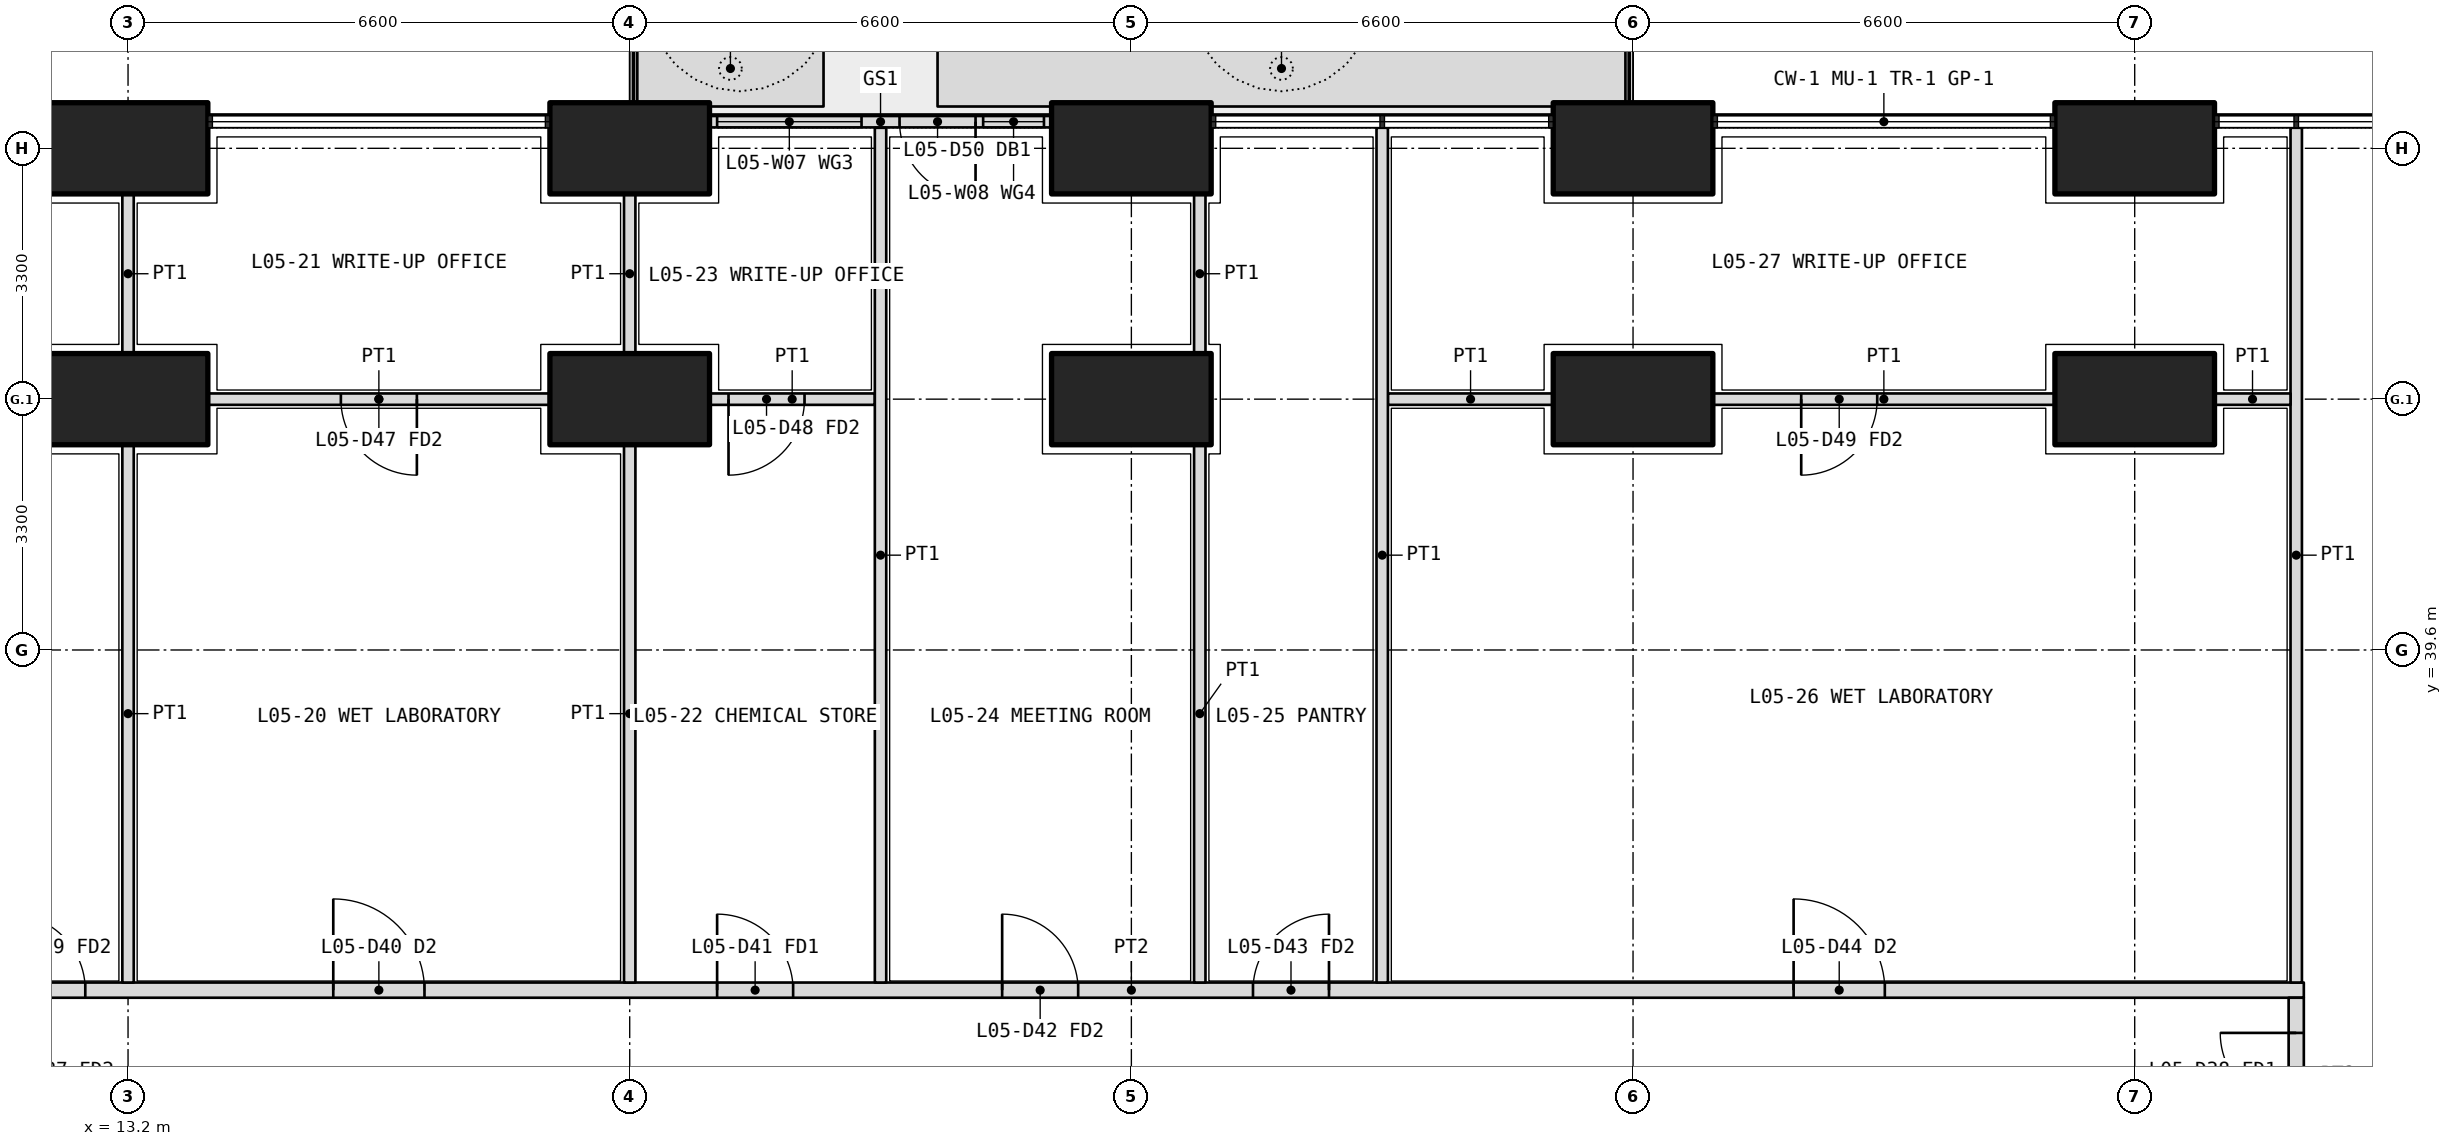
"""IFC4 building model, lengths in metres.
Left out: names, types, materials, properties, quantities, classifications, styles, units other than length and angle.
Written with IfcOpenShell. Run it as: python <this file> out.ifc"""

import sys

from ifc_helpers import new_model, si_unit, direction, frame, frame_2d, origin, origin_2d, place, context, subcontext, project, spatial, polyline, rectangle, outline, extrude, element, fill, save


model = new_model("IFC4")
c1 = context("Model", 3, precision=1e-05, world=origin(), true_north=direction((0.0, 1.0)))
c2 = subcontext(c1, "Body", "Model", "MODEL_VIEW")
j1 = project(units=[si_unit("LENGTHUNIT", "METRE"), si_unit("PLANEANGLEUNIT", "RADIAN")], contexts=[c1])
p1 = place(None, origin())
s1 = spatial("IfcSite", under=j1, at=p1, CompositionType="ELEMENT")
p2 = place(p1, origin())
s2 = spatial("IfcBuilding", under=s1, at=p2, CompositionType="ELEMENT")
p3 = place(p2, frame((0.0, 0.0, 25.5)))
s3 = spatial("IfcBuildingStorey", under=s2, at=p3, CompositionType="ELEMENT", Elevation=25.5)
for number, where, z_axis, x_axis in (
    (1, (13.2, 46.2, 0.0), (0.0, 0.0, 1.0), (1.0, 0.0, 0.0)),
    (2, (19.8, 46.2, 0.0), (0.0, 0.0, 1.0), (1.0, 0.0, 0.0)),
    (3, (26.4, 46.2, 0.0), (0.0, 0.0, 1.0), (1.0, 0.0, 0.0)),
    (4, (33.0, 46.2, 0.0), (0.0, 0.0, 1.0), (1.0, 0.0, 0.0)),
    (5, (39.6, 46.2, 0.0), (0.0, 0.0, 1.0), (1.0, 0.0, 0.0)),
    (6, (13.2, 42.9, 0.0), (0.0, 0.0, 1.0), (1.0, 0.0, 0.0)),
    (7, (19.8, 42.9, 0.0), (0.0, 0.0, 1.0), (1.0, 0.0, 0.0)),
    (8, (26.4, 42.9, 0.0), (0.0, 0.0, 1.0), (1.0, 0.0, 0.0)),
    (9, (33.0, 42.9, 0.0), (0.0, 0.0, 1.0), (1.0, 0.0, 0.0)),
    (10, (39.6, 42.9, 0.0), (0.0, 0.0, 1.0), (1.0, 0.0, 0.0)),
):
    element("IfcColumn", number, at=place(p3, frame(where, z_axis=z_axis, x_axis=x_axis)), inside=s3, PredefinedType="COLUMN", context=c2, shape_type="SweptSolid", body=[
        extrude(rectangle(XDim=2.1, YDim=1.2, at=origin_2d()), origin(), (0.0, 0.0, 1.0), 4.2),
    ])
p4 = place(p3, origin())
e11 = element("IfcWall", 11, at=p4, inside=s3, PredefinedType="USERDEFINED", context=c2, shape_type="SweptSolid", body=[
    extrude(outline(polyline([(19.9, 46.75), (22.35, 46.75), (22.35, 47.75), (19.9, 47.75), (19.9, 46.75)]), holes=[polyline([(20.05, 46.9), (22.2, 46.9), (22.2, 47.6), (20.05, 47.6), (20.05, 46.9)])]), origin(), (0.0, 0.0, 1.0), 1.05),
])
p5 = place(p3, origin())
e12 = element("IfcWall", 12, at=p5, inside=s3, PredefinedType="USERDEFINED", context=c2, shape_type="SweptSolid", body=[
    extrude(outline(polyline([(23.85, 46.75), (32.9, 46.75), (32.9, 47.75), (23.85, 47.75), (23.85, 46.75)]), holes=[polyline([(24.0, 46.9), (32.75, 46.9), (32.75, 47.6), (24.0, 47.6), (24.0, 46.9)])]), origin(), (0.0, 0.0, 1.0), 1.05),
])
p6 = place(p3, frame((25.35, 46.55, 0.0), z_axis=(0.0, 0.0, 1.0), x_axis=(-1.0, 0.0, 0.0)))
e13 = element("IfcWall", 13, at=p6, inside=s3, PredefinedType="SOLIDWALL", context=c2, shape_type="SweptSolid", body=[
    extrude(rectangle(XDim=4.5, YDim=0.15, at=frame_2d((2.25, 0.0))), origin(), (0.0, 0.0, 1.0), 2.7),
])
p7 = place(p6, frame((1.0, 0.0, 0.0)))
e14 = element("IfcOpeningElement", 14, at=p7, cuts=e13, PredefinedType="OPENING", context=c2, shape_type="SweptSolid", body=[
    extrude(rectangle(XDim=1.0, YDim=2.4, at=frame_2d((0.5, 1.2))), frame((0.0, 0.085, 0.0), z_axis=(0.0, -1.0, 0.0), x_axis=(1.0, 0.0, 0.0)), (0.0, 0.0, 1.0), 0.17),
])
p8 = place(p6, frame((0.1, 0.0, 0.1)))
e15 = element("IfcOpeningElement", 15, at=p8, cuts=e13, PredefinedType="OPENING", context=c2, shape_type="SweptSolid", body=[
    extrude(rectangle(XDim=0.8, YDim=2.3, at=frame_2d((0.4, 1.15))), frame((0.0, 0.085, 0.0), z_axis=(0.0, -1.0, 0.0), x_axis=(1.0, 0.0, 0.0)), (0.0, 0.0, 1.0), 0.17),
])
p9 = place(p6, frame((2.5, 0.0, 0.1)))
e16 = element("IfcOpeningElement", 16, at=p9, cuts=e13, PredefinedType="OPENING", context=c2, shape_type="SweptSolid", body=[
    extrude(rectangle(XDim=1.9, YDim=2.3, at=frame_2d((0.95, 1.15))), frame((0.0, 0.085, 0.0), z_axis=(0.0, -1.0, 0.0), x_axis=(1.0, 0.0, 0.0)), (0.0, 0.0, 1.0), 0.17),
])
p10 = place(p3, frame((10.975, 35.125, 0.0), z_axis=(0.0, 0.0, 1.0), x_axis=(1.0, 0.0, 0.0)))
e17 = element("IfcWall", 17, at=p10, inside=s3, PredefinedType="PARTITIONING", context=c2, shape_type="SweptSolid", body=[
    extrude(rectangle(XDim=30.85, YDim=0.2, at=frame_2d((15.425, 0.0))), origin(), (0.0, 0.0, 1.0), 2.85),
])
p11 = place(p10, frame((0.663, 0.0, 0.0)))
e18 = element("IfcOpeningElement", 18, at=p11, cuts=e17, PredefinedType="OPENING", context=c2, shape_type="SweptSolid", body=[
    extrude(rectangle(XDim=1.0, YDim=2.1, at=frame_2d((0.5, 1.05))), frame((0.0, 0.11, 0.0), z_axis=(0.0, -1.0, 0.0), x_axis=(1.0, 0.0, 0.0)), (0.0, 0.0, 1.0), 0.22),
])
p12 = place(p10, frame((4.925, 0.0, 0.0)))
e19 = element("IfcOpeningElement", 19, at=p12, cuts=e17, PredefinedType="OPENING", context=c2, shape_type="SweptSolid", body=[
    extrude(rectangle(XDim=1.2, YDim=2.1, at=frame_2d((0.6, 1.05))), frame((0.0, 0.11, 0.0), z_axis=(0.0, -1.0, 0.0), x_axis=(1.0, 0.0, 0.0)), (0.0, 0.0, 1.0), 0.22),
])
p13 = place(p10, frame((9.975, 0.0, 0.0)))
e20 = element("IfcOpeningElement", 20, at=p13, cuts=e17, PredefinedType="OPENING", context=c2, shape_type="SweptSolid", body=[
    extrude(rectangle(XDim=1.0, YDim=2.1, at=frame_2d((0.5, 1.05))), frame((0.0, 0.11, 0.0), z_axis=(0.0, -1.0, 0.0), x_axis=(1.0, 0.0, 0.0)), (0.0, 0.0, 1.0), 0.22),
])
p14 = place(p10, frame((13.725, 0.0, 0.0)))
e21 = element("IfcOpeningElement", 21, at=p14, cuts=e17, PredefinedType="OPENING", context=c2, shape_type="SweptSolid", body=[
    extrude(rectangle(XDim=1.0, YDim=2.1, at=frame_2d((0.5, 1.05))), frame((0.0, 0.11, 0.0), z_axis=(0.0, -1.0, 0.0), x_axis=(1.0, 0.0, 0.0)), (0.0, 0.0, 1.0), 0.22),
])
p15 = place(p10, frame((17.025, 0.0, 0.0)))
e22 = element("IfcOpeningElement", 22, at=p15, cuts=e17, PredefinedType="OPENING", context=c2, shape_type="SweptSolid", body=[
    extrude(rectangle(XDim=1.0, YDim=2.1, at=frame_2d((0.5, 1.05))), frame((0.0, 0.11, 0.0), z_axis=(0.0, -1.0, 0.0), x_axis=(1.0, 0.0, 0.0)), (0.0, 0.0, 1.0), 0.22),
])
p16 = place(p10, frame((24.137, 0.0, 0.0)))
e23 = element("IfcOpeningElement", 23, at=p16, cuts=e17, PredefinedType="OPENING", context=c2, shape_type="SweptSolid", body=[
    extrude(rectangle(XDim=1.2, YDim=2.1, at=frame_2d((0.6, 1.05))), frame((0.0, 0.11, 0.0), z_axis=(0.0, -1.0, 0.0), x_axis=(1.0, 0.0, 0.0)), (0.0, 0.0, 1.0), 0.22),
])
p17 = place(p3, frame((41.725, 33.0, 0.0), z_axis=(0.0, 0.0, 1.0), x_axis=(0.0, 1.0, 0.0)))
e24 = element("IfcWall", 24, at=p17, inside=s3, PredefinedType="PARTITIONING", context=c2, shape_type="SweptSolid", body=[
    extrude(rectangle(XDim=2.025, YDim=0.2, at=frame_2d((1.012, 0.0))), origin(), (0.0, 0.0, 1.0), 2.85),
])
p18 = place(p17, frame((0.562, 0.0, 0.0)))
e25 = element("IfcOpeningElement", 25, at=p18, cuts=e24, PredefinedType="OPENING", context=c2, shape_type="SweptSolid", body=[
    extrude(rectangle(XDim=1.0, YDim=2.1, at=frame_2d((0.5, 1.05))), frame((0.0, 0.11, 0.0), z_axis=(0.0, -1.0, 0.0), x_axis=(1.0, 0.0, 0.0)), (0.0, 0.0, 1.0), 0.22),
])
p19 = place(p3, frame((41.725, 46.47, 0.0), z_axis=(0.0, 0.0, 1.0), x_axis=(0.0, -1.0, 0.0)))
e26 = element("IfcWall", 26, at=p19, inside=s3, PredefinedType="PARTITIONING", context=c2, shape_type="SweptSolid", body=[
    extrude(rectangle(XDim=11.245, YDim=0.15, at=frame_2d((5.623, 0.0))), origin(), (0.0, 0.0, 1.0), 2.7),
])
p20 = place(p3, frame((41.65, 42.9, 0.0), z_axis=(0.0, 0.0, 1.0), x_axis=(-1.0, 0.0, 0.0)))
e27 = element("IfcWall", 27, at=p20, inside=s3, PredefinedType="PARTITIONING", context=c2, shape_type="SweptSolid", body=[
    extrude(rectangle(XDim=1.0, YDim=0.15, at=frame_2d((0.5, 0.0))), origin(), (0.0, 0.0, 1.0), 3.9),
])
p21 = place(p3, frame((38.55, 42.9, 0.0), z_axis=(0.0, 0.0, 1.0), x_axis=(-1.0, 0.0, 0.0)))
e28 = element("IfcWall", 28, at=p21, inside=s3, PredefinedType="PARTITIONING", context=c2, shape_type="SweptSolid", body=[
    extrude(rectangle(XDim=4.5, YDim=0.15, at=frame_2d((2.25, 0.0))), origin(), (0.0, 0.0, 1.0), 3.9),
])
p22 = place(p21, frame((2.337, 0.0, 0.0)))
e29 = element("IfcOpeningElement", 29, at=p22, cuts=e28, PredefinedType="OPENING", context=c2, shape_type="SweptSolid", body=[
    extrude(rectangle(XDim=1.0, YDim=2.1, at=frame_2d((0.5, 1.05))), frame((0.0, 0.085, 0.0), z_axis=(0.0, -1.0, 0.0), x_axis=(1.0, 0.0, 0.0)), (0.0, 0.0, 1.0), 0.17),
])
p23 = place(p3, frame((31.95, 42.9, 0.0), z_axis=(0.0, 0.0, 1.0), x_axis=(-1.0, 0.0, 0.0)))
e30 = element("IfcWall", 30, at=p23, inside=s3, PredefinedType="PARTITIONING", context=c2, shape_type="SweptSolid", body=[
    extrude(rectangle(XDim=2.175, YDim=0.15, at=frame_2d((1.087, 0.0))), origin(), (0.0, 0.0, 1.0), 3.9),
])
p24 = place(p3, frame((23.025, 42.9, 0.0), z_axis=(0.0, 0.0, 1.0), x_axis=(-1.0, 0.0, 0.0)))
e31 = element("IfcWall", 31, at=p24, inside=s3, PredefinedType="PARTITIONING", context=c2, shape_type="SweptSolid", body=[
    extrude(rectangle(XDim=2.175, YDim=0.15, at=frame_2d((1.087, 0.0))), origin(), (0.0, 0.0, 1.0), 3.9),
])
p25 = place(p24, frame((0.925, 0.0, 0.0)))
e32 = element("IfcOpeningElement", 32, at=p25, cuts=e31, PredefinedType="OPENING", context=c2, shape_type="SweptSolid", body=[
    extrude(rectangle(XDim=1.0, YDim=2.1, at=frame_2d((0.5, 1.05))), frame((0.0, 0.085, 0.0), z_axis=(0.0, -1.0, 0.0), x_axis=(1.0, 0.0, 0.0)), (0.0, 0.0, 1.0), 0.17),
])
p26 = place(p3, frame((18.75, 42.9, 0.0), z_axis=(0.0, 0.0, 1.0), x_axis=(-1.0, 0.0, 0.0)))
e33 = element("IfcWall", 33, at=p26, inside=s3, PredefinedType="PARTITIONING", context=c2, shape_type="SweptSolid", body=[
    extrude(rectangle(XDim=4.5, YDim=0.15, at=frame_2d((2.25, 0.0))), origin(), (0.0, 0.0, 1.0), 3.9),
])
p27 = place(p26, frame((1.75, 0.0, 0.0)))
e34 = element("IfcOpeningElement", 34, at=p27, cuts=e33, PredefinedType="OPENING", context=c2, shape_type="SweptSolid", body=[
    extrude(rectangle(XDim=1.0, YDim=2.1, at=frame_2d((0.5, 1.05))), frame((0.0, 0.085, 0.0), z_axis=(0.0, -1.0, 0.0), x_axis=(1.0, 0.0, 0.0)), (0.0, 0.0, 1.0), 0.17),
])
p28 = place(p3, frame((27.3, 45.6, 0.0), z_axis=(0.0, 0.0, 1.0), x_axis=(0.0, -1.0, 0.0)))
e35 = element("IfcWall", 35, at=p28, inside=s3, PredefinedType="PARTITIONING", context=c2, shape_type="SweptSolid", body=[
    extrude(rectangle(XDim=2.1, YDim=0.15, at=frame_2d((1.05, 0.0))), origin(), (0.0, 0.0, 1.0), 3.9),
])
p29 = place(p3, frame((27.3, 42.3, 0.0), z_axis=(0.0, 0.0, 1.0), x_axis=(0.0, -1.0, 0.0)))
e36 = element("IfcWall", 36, at=p29, inside=s3, PredefinedType="PARTITIONING", context=c2, shape_type="SweptSolid", body=[
    extrude(rectangle(XDim=7.075, YDim=0.15, at=frame_2d((3.538, 0.0))), origin(), (0.0, 0.0, 1.0), 3.9),
])
p30 = place(p3, frame((13.2, 45.6, 0.0), z_axis=(0.0, 0.0, 1.0), x_axis=(0.0, -1.0, 0.0)))
e37 = element("IfcWall", 37, at=p30, inside=s3, PredefinedType="PARTITIONING", context=c2, shape_type="SweptSolid", body=[
    extrude(rectangle(XDim=2.1, YDim=0.15, at=frame_2d((1.05, 0.0))), origin(), (0.0, 0.0, 1.0), 2.85),
])
p31 = place(p3, frame((13.2, 42.3, 0.0), z_axis=(0.0, 0.0, 1.0), x_axis=(0.0, -1.0, 0.0)))
e38 = element("IfcWall", 38, at=p31, inside=s3, PredefinedType="PARTITIONING", context=c2, shape_type="SweptSolid", body=[
    extrude(rectangle(XDim=7.075, YDim=0.15, at=frame_2d((3.538, 0.0))), origin(), (0.0, 0.0, 1.0), 2.85),
])
p32 = place(p3, frame((19.8, 45.6, 0.0), z_axis=(0.0, 0.0, 1.0), x_axis=(0.0, -1.0, 0.0)))
e39 = element("IfcWall", 39, at=p32, inside=s3, PredefinedType="PARTITIONING", context=c2, shape_type="SweptSolid", body=[
    extrude(rectangle(XDim=2.1, YDim=0.15, at=frame_2d((1.05, 0.0))), origin(), (0.0, 0.0, 1.0), 2.85),
])
p33 = place(p3, frame((19.8, 42.3, 0.0), z_axis=(0.0, 0.0, 1.0), x_axis=(0.0, -1.0, 0.0)))
e40 = element("IfcWall", 40, at=p33, inside=s3, PredefinedType="PARTITIONING", context=c2, shape_type="SweptSolid", body=[
    extrude(rectangle(XDim=7.075, YDim=0.15, at=frame_2d((3.538, 0.0))), origin(), (0.0, 0.0, 1.0), 2.85),
])
for number, where, z_axis, x_axis in (
    (41, (23.1, 46.47, 0.0), (0.0, 0.0, 1.0), (0.0, -1.0, 0.0)),
    (42, (29.7, 46.47, 0.0), (0.0, 0.0, 1.0), (0.0, -1.0, 0.0)),
):
    element("IfcWall", number, at=place(p3, frame(where, z_axis=z_axis, x_axis=x_axis)), inside=s3, PredefinedType="PARTITIONING", context=c2, shape_type="SweptSolid", body=[
        extrude(rectangle(XDim=11.245, YDim=0.15, at=frame_2d((5.623, 0.0))), origin(), (0.0, 0.0, 1.0), 2.7),
    ])
p34 = place(p7, origin())
e43 = element("IfcDoor", 43, at=p34, inside=s3, OperationType="SINGLE_SWING_LEFT", PredefinedType="DOOR", context=c2, shape_type="SweptSolid", body=[
    extrude(rectangle(XDim=1.0, YDim=2.4, at=frame_2d((0.5, 1.2))), frame((0.0, 0.025, 0.0), z_axis=(0.0, -1.0, 0.0), x_axis=(1.0, 0.0, 0.0)), (0.0, 0.0, 1.0), 0.05),
])
fill(e14, e43)
p35 = place(p8, origin())
e44 = element("IfcWindow", 44, at=p35, inside=s3, PartitioningType="SINGLE_PANEL", PredefinedType="WINDOW", context=c2, shape_type="SweptSolid", body=[
    extrude(rectangle(XDim=0.8, YDim=2.3, at=frame_2d((0.4, 1.15))), frame((0.0, 0.03, 0.0), z_axis=(0.0, -1.0, 0.0), x_axis=(1.0, 0.0, 0.0)), (0.0, 0.0, 1.0), 0.06),
])
fill(e15, e44)
p36 = place(p9, origin())
e45 = element("IfcWindow", 45, at=p36, inside=s3, PartitioningType="SINGLE_PANEL", PredefinedType="WINDOW", context=c2, shape_type="SweptSolid", body=[
    extrude(rectangle(XDim=1.9, YDim=2.3, at=frame_2d((0.95, 1.15))), frame((0.0, 0.03, 0.0), z_axis=(0.0, -1.0, 0.0), x_axis=(1.0, 0.0, 0.0)), (0.0, 0.0, 1.0), 0.06),
])
fill(e16, e45)
p37 = place(p18, origin())
e46 = element("IfcDoor", 46, at=p37, inside=s3, OperationType="SINGLE_SWING_RIGHT", PredefinedType="DOOR", context=c2, shape_type="SweptSolid", body=[
    extrude(rectangle(XDim=1.0, YDim=2.1, at=frame_2d((0.5, 1.05))), frame((0.0, 0.025, 0.0), z_axis=(0.0, -1.0, 0.0), x_axis=(1.0, 0.0, 0.0)), (0.0, 0.0, 1.0), 0.05),
])
fill(e25, e46)
p38 = place(p11, origin())
e47 = element("IfcDoor", 47, at=p38, inside=s3, OperationType="SINGLE_SWING_LEFT", PredefinedType="DOOR", context=c2, shape_type="SweptSolid", body=[
    extrude(rectangle(XDim=1.0, YDim=2.1, at=frame_2d((0.5, 1.05))), frame((0.0, 0.025, 0.0), z_axis=(0.0, -1.0, 0.0), x_axis=(1.0, 0.0, 0.0)), (0.0, 0.0, 1.0), 0.05),
])
fill(e18, e47)
p39 = place(p12, origin())
e48 = element("IfcDoor", 48, at=p39, inside=s3, OperationType="DOUBLE_DOOR_SINGLE_SWING", PredefinedType="DOOR", context=c2, shape_type="SweptSolid", body=[
    extrude(rectangle(XDim=1.2, YDim=2.1, at=frame_2d((0.6, 1.05))), frame((0.0, 0.025, 0.0), z_axis=(0.0, -1.0, 0.0), x_axis=(1.0, 0.0, 0.0)), (0.0, 0.0, 1.0), 0.05),
])
fill(e19, e48)
p40 = place(p27, origin())
e49 = element("IfcDoor", 49, at=p40, inside=s3, OperationType="SINGLE_SWING_LEFT", PredefinedType="DOOR", context=c2, shape_type="SweptSolid", body=[
    extrude(rectangle(XDim=1.0, YDim=2.1, at=frame_2d((0.5, 1.05))), frame((0.0, 0.025, 0.0), z_axis=(0.0, -1.0, 0.0), x_axis=(1.0, 0.0, 0.0)), (0.0, 0.0, 1.0), 0.05),
])
fill(e34, e49)
p41 = place(p13, origin())
e50 = element("IfcDoor", 50, at=p41, inside=s3, OperationType="SINGLE_SWING_LEFT", PredefinedType="DOOR", context=c2, shape_type="SweptSolid", body=[
    extrude(rectangle(XDim=1.0, YDim=2.1, at=frame_2d((0.5, 1.05))), frame((0.0, 0.025, 0.0), z_axis=(0.0, -1.0, 0.0), x_axis=(1.0, 0.0, 0.0)), (0.0, 0.0, 1.0), 0.05),
])
fill(e20, e50)
p42 = place(p25, origin())
e51 = element("IfcDoor", 51, at=p42, inside=s3, OperationType="SINGLE_SWING_RIGHT", PredefinedType="DOOR", context=c2, shape_type="SweptSolid", body=[
    extrude(rectangle(XDim=1.0, YDim=2.1, at=frame_2d((0.5, 1.05))), frame((0.0, 0.025, 0.0), z_axis=(0.0, -1.0, 0.0), x_axis=(1.0, 0.0, 0.0)), (0.0, 0.0, 1.0), 0.05),
])
fill(e32, e51)
p43 = place(p14, origin())
e52 = element("IfcDoor", 52, at=p43, inside=s3, OperationType="SINGLE_SWING_LEFT", PredefinedType="DOOR", context=c2, shape_type="SweptSolid", body=[
    extrude(rectangle(XDim=1.0, YDim=2.1, at=frame_2d((0.5, 1.05))), frame((0.0, 0.025, 0.0), z_axis=(0.0, -1.0, 0.0), x_axis=(1.0, 0.0, 0.0)), (0.0, 0.0, 1.0), 0.05),
])
fill(e21, e52)
p44 = place(p15, origin())
e53 = element("IfcDoor", 53, at=p44, inside=s3, OperationType="SINGLE_SWING_RIGHT", PredefinedType="DOOR", context=c2, shape_type="SweptSolid", body=[
    extrude(rectangle(XDim=1.0, YDim=2.1, at=frame_2d((0.5, 1.05))), frame((0.0, 0.025, 0.0), z_axis=(0.0, -1.0, 0.0), x_axis=(1.0, 0.0, 0.0)), (0.0, 0.0, 1.0), 0.05),
])
fill(e22, e53)
p45 = place(p16, origin())
e54 = element("IfcDoor", 54, at=p45, inside=s3, OperationType="DOUBLE_DOOR_SINGLE_SWING", PredefinedType="DOOR", context=c2, shape_type="SweptSolid", body=[
    extrude(rectangle(XDim=1.2, YDim=2.1, at=frame_2d((0.6, 1.05))), frame((0.0, 0.025, 0.0), z_axis=(0.0, -1.0, 0.0), x_axis=(1.0, 0.0, 0.0)), (0.0, 0.0, 1.0), 0.05),
])
fill(e23, e54)
p46 = place(p22, origin())
e55 = element("IfcDoor", 55, at=p46, inside=s3, OperationType="SINGLE_SWING_RIGHT", PredefinedType="DOOR", context=c2, shape_type="SweptSolid", body=[
    extrude(rectangle(XDim=1.0, YDim=2.1, at=frame_2d((0.5, 1.05))), frame((0.0, 0.025, 0.0), z_axis=(0.0, -1.0, 0.0), x_axis=(1.0, 0.0, 0.0)), (0.0, 0.0, 1.0), 0.05),
])
fill(e29, e55)
save(model, sys.argv[1])
